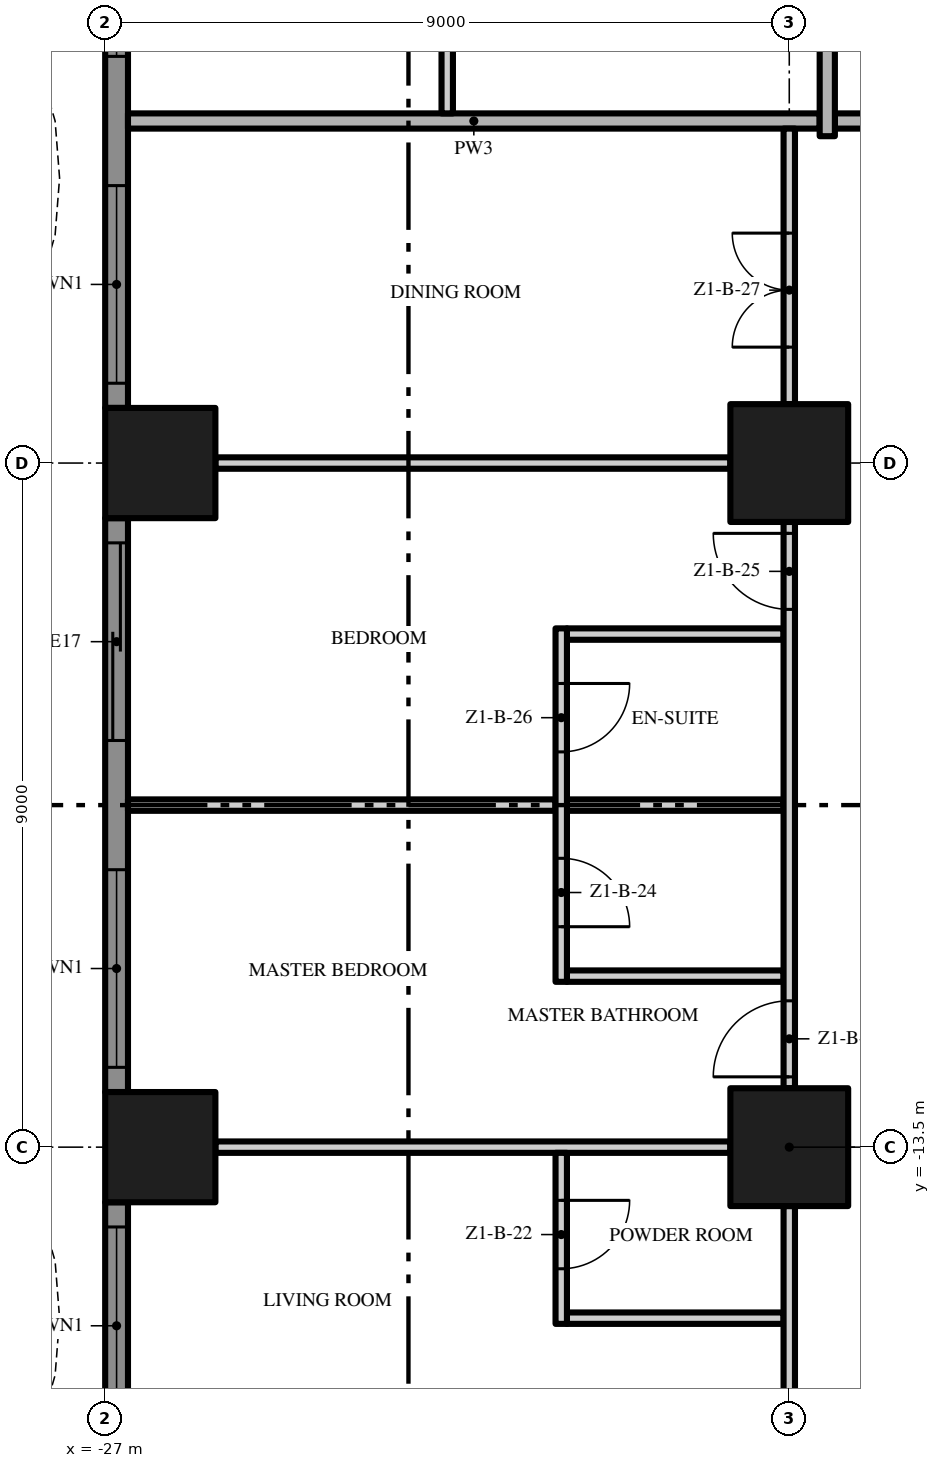
"""IFC4 building model, lengths in metres.
Left out: names, types, materials, properties, quantities, classifications, styles, units other than length and angle.
Written with IfcOpenShell. Run it as: python <this file> out.ifc"""

import sys

from ifc_helpers import new_model, si_unit, direction, frame, frame_2d, origin, origin_2d, place, context, subcontext, project, spatial, polyline, rectangle, outline, extrude, element, fill, save


model = new_model("IFC4")
c1 = context("Model", 3, precision=1e-05, world=origin(), true_north=direction((0.0, 1.0)))
c2 = subcontext(c1, "Body", "Model", "MODEL_VIEW")
j1 = project(units=[si_unit("LENGTHUNIT", "METRE"), si_unit("PLANEANGLEUNIT", "RADIAN")], contexts=[c1])
p1 = place(None, origin())
s1 = spatial("IfcSite", under=j1, at=p1, CompositionType="ELEMENT")
p2 = place(p1, origin())
s2 = spatial("IfcBuilding", under=s1, at=p2, CompositionType="ELEMENT")
p3 = place(p2, frame((0.0, 0.0, 30.2)))
s3 = spatial("IfcBuildingStorey", under=s2, at=p3, CompositionType="ELEMENT", Elevation=30.2)
for number, where, z_axis, x_axis in (
    (1, (-18.0, -13.5, 0.0), (0.0, 0.0, 1.0), (1.0, 0.0, 0.0)),
    (2, (-18.0, -4.5, 0.0), (0.0, 0.0, 1.0), (1.0, 0.0, 0.0)),
):
    element("IfcColumn", number, at=place(p3, frame(where, z_axis=z_axis, x_axis=x_axis)), inside=s3, PredefinedType="COLUMN", context=c2, shape_type="SweptSolid", body=[
        extrude(rectangle(XDim=1.55, YDim=1.55, at=origin_2d()), origin(), (0.0, 0.0, 1.0), 3.5),
    ])
for number, where, z_axis, x_axis in (
    (3, (-26.275, -13.5, 0.0), (0.0, 0.0, 1.0), (1.0, 0.0, 0.0)),
    (4, (-26.275, -4.5, 0.0), (0.0, 0.0, 1.0), (1.0, 0.0, 0.0)),
):
    element("IfcColumn", number, at=place(p3, frame(where, z_axis=z_axis, x_axis=x_axis)), inside=s3, PredefinedType="COLUMN", context=c2, shape_type="SweptSolid", body=[
        extrude(rectangle(XDim=1.45, YDim=1.45, at=origin_2d()), origin(), (0.0, 0.0, 1.0), 3.5),
    ])
p4 = place(p3, frame((-26.85, -3.775, 0.0), z_axis=(0.0, 0.0, 1.0), x_axis=(0.0, 1.0, 0.0)))
e5 = element("IfcWall", 5, at=p4, inside=s3, PredefinedType="SOLIDWALL", context=c2, shape_type="SweptSolid", body=[
    extrude(rectangle(XDim=7.55, YDim=0.3, at=frame_2d((3.775, 0.0))), origin(), (0.0, 0.0, 1.0), 3.5),
])
p5 = place(p4, frame((4.625, 0.0, 0.45)))
e6 = element("IfcOpeningElement", 6, at=p5, cuts=e5, PredefinedType="OPENING", context=c2, shape_type="SweptSolid", body=[
    extrude(rectangle(XDim=2.6, YDim=2.65, at=frame_2d((1.3, 1.325))), frame((0.0, 0.16, 0.0), z_axis=(0.0, -1.0, 0.0), x_axis=(1.0, 0.0, 0.0)), (0.0, 0.0, 1.0), 0.32),
])
p6 = place(p4, frame((0.325, 0.0, 0.45)))
e7 = element("IfcOpeningElement", 7, at=p6, cuts=e5, PredefinedType="OPENING", context=c2, shape_type="SweptSolid", body=[
    extrude(rectangle(XDim=2.6, YDim=2.65, at=frame_2d((1.3, 1.325))), frame((0.0, 0.16, 0.0), z_axis=(0.0, -1.0, 0.0), x_axis=(1.0, 0.0, 0.0)), (0.0, 0.0, 1.0), 0.32),
])
p7 = place(p3, frame((-26.85, -12.775, 0.0), z_axis=(0.0, 0.0, 1.0), x_axis=(0.0, 1.0, 0.0)))
e8 = element("IfcWall", 8, at=p7, inside=s3, PredefinedType="SOLIDWALL", context=c2, shape_type="SweptSolid", body=[
    extrude(rectangle(XDim=7.55, YDim=0.3, at=frame_2d((3.775, 0.0))), origin(), (0.0, 0.0, 1.0), 3.5),
])
p8 = place(p7, frame((4.625, 0.0, 0.0)))
e9 = element("IfcOpeningElement", 9, at=p8, cuts=e8, PredefinedType="OPENING", context=c2, shape_type="SweptSolid", body=[
    extrude(rectangle(XDim=2.6, YDim=2.4, at=frame_2d((1.3, 1.2))), frame((0.0, 0.16, 0.0), z_axis=(0.0, -1.0, 0.0), x_axis=(1.0, 0.0, 0.0)), (0.0, 0.0, 1.0), 0.32),
])
p9 = place(p7, frame((0.325, 0.0, 0.45)))
e10 = element("IfcOpeningElement", 10, at=p9, cuts=e8, PredefinedType="OPENING", context=c2, shape_type="SweptSolid", body=[
    extrude(rectangle(XDim=2.6, YDim=2.65, at=frame_2d((1.3, 1.325))), frame((0.0, 0.16, 0.0), z_axis=(0.0, -1.0, 0.0), x_axis=(1.0, 0.0, 0.0)), (0.0, 0.0, 1.0), 0.32),
])
p10 = place(p3, frame((-26.85, -18.0, 0.0), z_axis=(0.0, 0.0, 1.0), x_axis=(0.0, 1.0, 0.0)))
e11 = element("IfcWall", 11, at=p10, inside=s3, PredefinedType="SOLIDWALL", context=c2, shape_type="SweptSolid", body=[
    extrude(rectangle(XDim=3.775, YDim=0.3, at=frame_2d((1.887, 0.0))), origin(), (0.0, 0.0, 1.0), 3.5),
])
p11 = place(p10, frame((0.85, 0.0, 0.45)))
e12 = element("IfcOpeningElement", 12, at=p11, cuts=e11, PredefinedType="OPENING", context=c2, shape_type="SweptSolid", body=[
    extrude(rectangle(XDim=2.6, YDim=2.65, at=frame_2d((1.3, 1.325))), frame((0.0, 0.16, 0.0), z_axis=(0.0, -1.0, 0.0), x_axis=(1.0, 0.0, 0.0)), (0.0, 0.0, 1.0), 0.32),
])
p12 = place(p3, origin())
e13 = element("IfcWall", 13, at=p12, inside=s3, PredefinedType="USERDEFINED", context=c2, shape_type="SweptSolid", body=[
    extrude(outline(polyline([(-28.8, 18.0), (-28.095, 16.5), (-27.659, 15.0), (-27.6, 14.25), (-27.659, 13.5), (-28.095, 12.0), (-28.8, 10.5), (-29.505, 9.0), (-29.941, 7.5), (-30.0, 6.75), (-29.941, 6.0), (-29.505, 4.5), (-28.8, 3.0), (-28.095, 1.5), (-27.659, 0.0), (-27.6, -0.75), (-27.659, -1.5), (-28.095, -3.0), (-28.8, -4.5), (-29.505, -6.0), (-29.941, -7.5), (-30.0, -8.25), (-29.941, -9.0), (-29.505, -10.5), (-28.8, -12.0), (-28.095, -13.5), (-27.659, -15.0), (-27.6, -15.75), (-27.659, -16.5), (-28.095, -18.0), (-27.855, -18.07), (-27.411, -16.545), (-27.349, -15.75), (-27.411, -14.955), (-27.86, -13.411), (-28.574, -11.894), (-29.271, -10.411), (-29.694, -8.955), (-29.749, -8.25), (-29.694, -7.545), (-29.271, -6.089), (-28.574, -4.606), (-27.86, -3.089), (-27.411, -1.545), (-27.349, -0.75), (-27.411, 0.045), (-27.86, 1.589), (-28.574, 3.106), (-29.271, 4.589), (-29.694, 6.045), (-29.749, 6.75), (-29.694, 7.455), (-29.271, 8.911), (-28.574, 10.394), (-27.86, 11.911), (-27.411, 13.455), (-27.349, 14.25), (-27.411, 15.045), (-27.86, 16.589), (-28.574, 18.106), (-28.8, 18.0)])), origin(), (0.0, 0.0, 1.0), 0.9),
])
p13 = place(p3, frame((-20.925, -15.75, 0.0), z_axis=(0.0, 0.0, 1.0), x_axis=(1.0, 0.0, 0.0)))
e14 = element("IfcWall", 14, at=p13, inside=s3, PredefinedType="PARTITIONING", context=c2, shape_type="SweptSolid", body=[
    extrude(rectangle(XDim=2.85, YDim=0.15, at=frame_2d((1.425, 0.0))), origin(), (0.0, 0.0, 1.0), 3.5),
])
p14 = place(p3, frame((-25.55, -13.5, 0.0), z_axis=(0.0, 0.0, 1.0), x_axis=(1.0, 0.0, 0.0)))
e15 = element("IfcWall", 15, at=p14, inside=s3, PredefinedType="PARTITIONING", context=c2, shape_type="SweptSolid", body=[
    extrude(rectangle(XDim=6.775, YDim=0.15, at=frame_2d((3.388, 0.0))), origin(), (0.0, 0.0, 1.0), 3.5),
])
p15 = place(p3, frame((-20.925, -11.25, 0.0), z_axis=(0.0, 0.0, 1.0), x_axis=(1.0, 0.0, 0.0)))
e16 = element("IfcWall", 16, at=p15, inside=s3, PredefinedType="PARTITIONING", context=c2, shape_type="SweptSolid", body=[
    extrude(rectangle(XDim=2.85, YDim=0.15, at=frame_2d((1.425, 0.0))), origin(), (0.0, 0.0, 1.0), 3.5),
])
p16 = place(p3, frame((-26.7, -9.0, 0.0), z_axis=(0.0, 0.0, 1.0), x_axis=(1.0, 0.0, 0.0)))
e17 = element("IfcWall", 17, at=p16, inside=s3, PredefinedType="PARTITIONING", context=c2, shape_type="SweptSolid", body=[
    extrude(rectangle(XDim=5.625, YDim=0.15, at=frame_2d((2.812, 0.0))), origin(), (0.0, 0.0, 1.0), 3.5),
])
for number, where, z_axis, x_axis in (
    (18, (-20.925, -9.0, 0.0), (0.0, 0.0, 1.0), (1.0, 0.0, 0.0)),
    (19, (-20.925, -6.75, 0.0), (0.0, 0.0, 1.0), (1.0, 0.0, 0.0)),
):
    element("IfcWall", number, at=place(p3, frame(where, z_axis=z_axis, x_axis=x_axis)), inside=s3, PredefinedType="PARTITIONING", context=c2, shape_type="SweptSolid", body=[
        extrude(rectangle(XDim=2.85, YDim=0.15, at=frame_2d((1.425, 0.0))), origin(), (0.0, 0.0, 1.0), 3.5),
    ])
p17 = place(p3, frame((-25.55, -4.5, 0.0), z_axis=(0.0, 0.0, 1.0), x_axis=(1.0, 0.0, 0.0)))
e20 = element("IfcWall", 20, at=p17, inside=s3, PredefinedType="PARTITIONING", context=c2, shape_type="SweptSolid", body=[
    extrude(rectangle(XDim=6.775, YDim=0.15, at=frame_2d((3.388, 0.0))), origin(), (0.0, 0.0, 1.0), 3.5),
])
p18 = place(p3, frame((-17.4, 0.0, 0.0), z_axis=(0.0, 0.0, 1.0), x_axis=(1.0, 0.0, 0.0)))
e21 = element("IfcWall", 21, at=p18, inside=s3, PredefinedType="PARTITIONING", context=c2, shape_type="SweptSolid", body=[
    extrude(rectangle(XDim=12.8, YDim=0.2, at=frame_2d((6.4, 0.0))), origin(), (0.0, 0.0, 1.0), 3.5),
])
p19 = place(p3, frame((-26.7, 0.0, 0.0), z_axis=(0.0, 0.0, 1.0), x_axis=(1.0, 0.0, 0.0)))
e22 = element("IfcWall", 22, at=p19, inside=s3, PredefinedType="PARTITIONING", context=c2, shape_type="SweptSolid", body=[
    extrude(rectangle(XDim=9.1, YDim=0.2, at=frame_2d((4.55, 0.0))), origin(), (0.0, 0.0, 1.0), 3.5),
])
p20 = place(p3, frame((-22.5, 0.1, 0.0), z_axis=(0.0, 0.0, 1.0), x_axis=(0.0, 1.0, 0.0)))
e23 = element("IfcWall", 23, at=p20, inside=s3, PredefinedType="PARTITIONING", context=c2, shape_type="SweptSolid", body=[
    extrude(rectangle(XDim=17.175, YDim=0.15, at=frame_2d((8.588, 0.0))), origin(), (0.0, 0.0, 1.0), 3.5),
])
p21 = place(p20, frame((1.65, 0.0, 0.0)))
e24 = element("IfcOpeningElement", 24, at=p21, cuts=e23, PredefinedType="OPENING", context=c2, shape_type="SweptSolid", body=[
    extrude(rectangle(XDim=1.0, YDim=2.4, at=frame_2d((0.5, 1.2))), frame((0.0, 0.085, 0.0), z_axis=(0.0, -1.0, 0.0), x_axis=(1.0, 0.0, 0.0)), (0.0, 0.0, 1.0), 0.17),
])
p22 = place(p20, frame((8.0, 0.0, 0.0)))
e25 = element("IfcOpeningElement", 25, at=p22, cuts=e23, PredefinedType="OPENING", context=c2, shape_type="SweptSolid", body=[
    extrude(rectangle(XDim=1.8, YDim=2.4, at=frame_2d((0.9, 1.2))), frame((0.0, 0.085, 0.0), z_axis=(0.0, -1.0, 0.0), x_axis=(1.0, 0.0, 0.0)), (0.0, 0.0, 1.0), 0.17),
])
p23 = place(p20, frame((16.025, 0.0, 0.0)))
e26 = element("IfcOpeningElement", 26, at=p23, cuts=e23, PredefinedType="OPENING", context=c2, shape_type="SweptSolid", body=[
    extrude(rectangle(XDim=1.0, YDim=2.4, at=frame_2d((0.5, 1.2))), frame((0.0, 0.085, 0.0), z_axis=(0.0, -1.0, 0.0), x_axis=(1.0, 0.0, 0.0)), (0.0, 0.0, 1.0), 0.17),
])
p24 = place(p3, frame((-21.0, -13.575, 0.0), z_axis=(0.0, 0.0, 1.0), x_axis=(0.0, -1.0, 0.0)))
e27 = element("IfcWall", 27, at=p24, inside=s3, PredefinedType="PARTITIONING", context=c2, shape_type="SweptSolid", body=[
    extrude(rectangle(XDim=2.25, YDim=0.15, at=frame_2d((1.125, 0.0))), origin(), (0.0, 0.0, 1.0), 3.5),
])
p25 = place(p24, frame((0.625, 0.0, 0.0)))
e28 = element("IfcOpeningElement", 28, at=p25, cuts=e27, PredefinedType="OPENING", context=c2, shape_type="SweptSolid", body=[
    extrude(rectangle(XDim=0.9, YDim=2.1, at=frame_2d((0.45, 1.05))), frame((0.0, 0.085, 0.0), z_axis=(0.0, -1.0, 0.0), x_axis=(1.0, 0.0, 0.0)), (0.0, 0.0, 1.0), 0.17),
])
p26 = place(p3, frame((-21.0, -6.675, 0.0), z_axis=(0.0, 0.0, 1.0), x_axis=(0.0, -1.0, 0.0)))
e29 = element("IfcWall", 29, at=p26, inside=s3, PredefinedType="PARTITIONING", context=c2, shape_type="SweptSolid", body=[
    extrude(rectangle(XDim=4.65, YDim=0.15, at=frame_2d((2.325, 0.0))), origin(), (0.0, 0.0, 1.0), 3.5),
])
p27 = place(p26, frame((3.025, 0.0, 0.0)))
e30 = element("IfcOpeningElement", 30, at=p27, cuts=e29, PredefinedType="OPENING", context=c2, shape_type="SweptSolid", body=[
    extrude(rectangle(XDim=0.9, YDim=2.1, at=frame_2d((0.45, 1.05))), frame((0.0, 0.085, 0.0), z_axis=(0.0, -1.0, 0.0), x_axis=(1.0, 0.0, 0.0)), (0.0, 0.0, 1.0), 0.17),
])
p28 = place(p26, frame((0.725, 0.0, 0.0)))
e31 = element("IfcOpeningElement", 31, at=p28, cuts=e29, PredefinedType="OPENING", context=c2, shape_type="SweptSolid", body=[
    extrude(rectangle(XDim=0.9, YDim=2.1, at=frame_2d((0.45, 1.05))), frame((0.0, 0.085, 0.0), z_axis=(0.0, -1.0, 0.0), x_axis=(1.0, 0.0, 0.0)), (0.0, 0.0, 1.0), 0.17),
])
p29 = place(p3, frame((-18.0, -21.05, 0.0), z_axis=(0.0, 0.0, 1.0), x_axis=(0.0, 1.0, 0.0)))
e32 = element("IfcWall", 32, at=p29, inside=s3, PredefinedType="PARTITIONING", context=c2, shape_type="SweptSolid", body=[
    extrude(rectangle(XDim=6.775, YDim=0.15, at=frame_2d((3.388, 0.0))), origin(), (0.0, 0.0, 1.0), 3.5),
])
p30 = place(p29, frame((1.0, 0.0, 0.0)))
e33 = element("IfcOpeningElement", 33, at=p30, cuts=e32, PredefinedType="OPENING", context=c2, shape_type="SweptSolid", body=[
    extrude(rectangle(XDim=1.8, YDim=2.4, at=frame_2d((0.9, 1.2))), frame((0.0, 0.085, 0.0), z_axis=(0.0, -1.0, 0.0), x_axis=(1.0, 0.0, 0.0)), (0.0, 0.0, 1.0), 0.17),
])
p31 = place(p3, frame((-18.0, -12.725, 0.0), z_axis=(0.0, 0.0, 1.0), x_axis=(0.0, 1.0, 0.0)))
e34 = element("IfcWall", 34, at=p31, inside=s3, PredefinedType="PARTITIONING", context=c2, shape_type="SweptSolid", body=[
    extrude(rectangle(XDim=7.45, YDim=0.15, at=frame_2d((3.725, 0.0))), origin(), (0.0, 0.0, 1.0), 3.5),
])
p32 = place(p31, frame((0.15, 0.0, 0.0)))
e35 = element("IfcOpeningElement", 35, at=p32, cuts=e34, PredefinedType="OPENING", context=c2, shape_type="SweptSolid", body=[
    extrude(rectangle(XDim=1.0, YDim=2.4, at=frame_2d((0.5, 1.2))), frame((0.0, 0.085, 0.0), z_axis=(0.0, -1.0, 0.0), x_axis=(1.0, 0.0, 0.0)), (0.0, 0.0, 1.0), 0.17),
])
p33 = place(p31, frame((6.3, 0.0, 0.0)))
e36 = element("IfcOpeningElement", 36, at=p33, cuts=e34, PredefinedType="OPENING", context=c2, shape_type="SweptSolid", body=[
    extrude(rectangle(XDim=1.0, YDim=2.4, at=frame_2d((0.5, 1.2))), frame((0.0, 0.085, 0.0), z_axis=(0.0, -1.0, 0.0), x_axis=(1.0, 0.0, 0.0)), (0.0, 0.0, 1.0), 0.17),
])
p34 = place(p3, frame((-18.0, -3.725, 0.0), z_axis=(0.0, 0.0, 1.0), x_axis=(0.0, 1.0, 0.0)))
e37 = element("IfcWall", 37, at=p34, inside=s3, PredefinedType="PARTITIONING", context=c2, shape_type="SweptSolid", body=[
    extrude(rectangle(XDim=3.625, YDim=0.15, at=frame_2d((1.812, 0.0))), origin(), (0.0, 0.0, 1.0), 3.5),
])
p35 = place(p34, frame((0.75, 0.0, 0.0)))
e38 = element("IfcOpeningElement", 38, at=p35, cuts=e37, PredefinedType="OPENING", context=c2, shape_type="SweptSolid", body=[
    extrude(rectangle(XDim=1.5, YDim=2.4, at=frame_2d((0.75, 1.2))), frame((0.0, 0.085, 0.0), z_axis=(0.0, -1.0, 0.0), x_axis=(1.0, 0.0, 0.0)), (0.0, 0.0, 1.0), 0.17),
])
p36 = place(p3, frame((-17.5, -0.2, 0.0), z_axis=(0.0, 0.0, 1.0), x_axis=(0.0, 1.0, 0.0)))
e39 = element("IfcWall", 39, at=p36, inside=s3, PredefinedType="PARTITIONING", context=c2, shape_type="SweptSolid", body=[
    extrude(rectangle(XDim=3.925, YDim=0.2, at=frame_2d((1.962, 0.0))), origin(), (0.0, 0.0, 1.0), 3.5),
])
p37 = place(p5, origin())
e40 = element("IfcWindow", 40, at=p37, inside=s3, PartitioningType="SINGLE_PANEL", PredefinedType="WINDOW", context=c2, shape_type="SweptSolid", body=[
    extrude(rectangle(XDim=2.6, YDim=2.65, at=frame_2d((1.3, 1.325))), frame((0.0, 0.03, 0.0), z_axis=(0.0, -1.0, 0.0), x_axis=(1.0, 0.0, 0.0)), (0.0, 0.0, 1.0), 0.06),
])
fill(e6, e40)
p38 = place(p6, origin())
e41 = element("IfcWindow", 41, at=p38, inside=s3, PartitioningType="SINGLE_PANEL", PredefinedType="WINDOW", context=c2, shape_type="SweptSolid", body=[
    extrude(rectangle(XDim=2.6, YDim=2.65, at=frame_2d((1.3, 1.325))), frame((0.0, 0.03, 0.0), z_axis=(0.0, -1.0, 0.0), x_axis=(1.0, 0.0, 0.0)), (0.0, 0.0, 1.0), 0.06),
])
fill(e7, e41)
p39 = place(p8, origin())
e42 = element("IfcDoor", 42, at=p39, inside=s3, OperationType="SINGLE_SWING_LEFT", PredefinedType="DOOR", context=c2, shape_type="SweptSolid", body=[
    extrude(rectangle(XDim=2.6, YDim=2.4, at=frame_2d((1.3, 1.2))), frame((0.0, 0.025, 0.0), z_axis=(0.0, -1.0, 0.0), x_axis=(1.0, 0.0, 0.0)), (0.0, 0.0, 1.0), 0.05),
])
fill(e9, e42)
p40 = place(p9, origin())
e43 = element("IfcWindow", 43, at=p40, inside=s3, PartitioningType="SINGLE_PANEL", PredefinedType="WINDOW", context=c2, shape_type="SweptSolid", body=[
    extrude(rectangle(XDim=2.6, YDim=2.65, at=frame_2d((1.3, 1.325))), frame((0.0, 0.03, 0.0), z_axis=(0.0, -1.0, 0.0), x_axis=(1.0, 0.0, 0.0)), (0.0, 0.0, 1.0), 0.06),
])
fill(e10, e43)
p41 = place(p11, origin())
e44 = element("IfcWindow", 44, at=p41, inside=s3, PartitioningType="SINGLE_PANEL", PredefinedType="WINDOW", context=c2, shape_type="SweptSolid", body=[
    extrude(rectangle(XDim=2.6, YDim=2.65, at=frame_2d((1.3, 1.325))), frame((0.0, 0.03, 0.0), z_axis=(0.0, -1.0, 0.0), x_axis=(1.0, 0.0, 0.0)), (0.0, 0.0, 1.0), 0.06),
])
fill(e12, e44)
p42 = place(p25, origin())
e45 = element("IfcDoor", 45, at=p42, inside=s3, OperationType="SINGLE_SWING_LEFT", PredefinedType="DOOR", context=c2, shape_type="SweptSolid", body=[
    extrude(rectangle(XDim=0.9, YDim=2.1, at=frame_2d((0.45, 1.05))), frame((0.0, 0.025, 0.0), z_axis=(0.0, -1.0, 0.0), x_axis=(1.0, 0.0, 0.0)), (0.0, 0.0, 1.0), 0.05),
])
fill(e28, e45)
p43 = place(p32, origin())
e46 = element("IfcDoor", 46, at=p43, inside=s3, OperationType="SINGLE_SWING_LEFT", PredefinedType="DOOR", context=c2, shape_type="SweptSolid", body=[
    extrude(rectangle(XDim=1.0, YDim=2.4, at=frame_2d((0.5, 1.2))), frame((0.0, 0.025, 0.0), z_axis=(0.0, -1.0, 0.0), x_axis=(1.0, 0.0, 0.0)), (0.0, 0.0, 1.0), 0.05),
])
fill(e35, e46)
p44 = place(p27, origin())
e47 = element("IfcDoor", 47, at=p44, inside=s3, OperationType="SINGLE_SWING_RIGHT", PredefinedType="DOOR", context=c2, shape_type="SweptSolid", body=[
    extrude(rectangle(XDim=0.9, YDim=2.1, at=frame_2d((0.45, 1.05))), frame((0.0, 0.025, 0.0), z_axis=(0.0, -1.0, 0.0), x_axis=(1.0, 0.0, 0.0)), (0.0, 0.0, 1.0), 0.05),
])
fill(e30, e47)
p45 = place(p33, origin())
e48 = element("IfcDoor", 48, at=p45, inside=s3, OperationType="SINGLE_SWING_RIGHT", PredefinedType="DOOR", context=c2, shape_type="SweptSolid", body=[
    extrude(rectangle(XDim=1.0, YDim=2.4, at=frame_2d((0.5, 1.2))), frame((0.0, 0.025, 0.0), z_axis=(0.0, -1.0, 0.0), x_axis=(1.0, 0.0, 0.0)), (0.0, 0.0, 1.0), 0.05),
])
fill(e36, e48)
p46 = place(p28, origin())
e49 = element("IfcDoor", 49, at=p46, inside=s3, OperationType="SINGLE_SWING_LEFT", PredefinedType="DOOR", context=c2, shape_type="SweptSolid", body=[
    extrude(rectangle(XDim=0.9, YDim=2.1, at=frame_2d((0.45, 1.05))), frame((0.0, 0.025, 0.0), z_axis=(0.0, -1.0, 0.0), x_axis=(1.0, 0.0, 0.0)), (0.0, 0.0, 1.0), 0.05),
])
fill(e31, e49)
p47 = place(p35, origin())
e50 = element("IfcDoor", 50, at=p47, inside=s3, OperationType="DOUBLE_DOOR_SINGLE_SWING", PredefinedType="DOOR", context=c2, shape_type="SweptSolid", body=[
    extrude(rectangle(XDim=1.5, YDim=2.4, at=frame_2d((0.75, 1.2))), frame((0.0, 0.025, 0.0), z_axis=(0.0, -1.0, 0.0), x_axis=(1.0, 0.0, 0.0)), (0.0, 0.0, 1.0), 0.05),
])
fill(e38, e50)
save(model, sys.argv[1])
